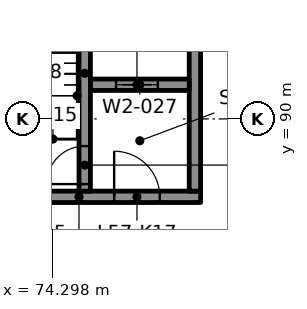
"""IFC4 building model, lengths in metres.
Left out: names, types, materials, properties, quantities, classifications, styles, units other than length and angle.
Written with IfcOpenShell. Run it as: python <this file> out.ifc"""

import sys

from ifc_helpers import new_model, si_unit, direction, frame, frame_2d, origin, place, context, subcontext, project, spatial, rectangle, extrude, element, fill, save


model = new_model("IFC4")
c1 = context("Model", 3, precision=1e-05, world=origin(), true_north=direction((0.0, 1.0)))
c2 = subcontext(c1, "Body", "Model", "MODEL_VIEW")
j1 = project(units=[si_unit("LENGTHUNIT", "METRE"), si_unit("PLANEANGLEUNIT", "RADIAN")], contexts=[c1])
p1 = place(None, origin())
s1 = spatial("IfcSite", under=j1, at=p1, CompositionType="ELEMENT")
p2 = place(p1, origin())
s2 = spatial("IfcBuilding", under=s1, at=p2, CompositionType="ELEMENT")
p3 = place(p2, frame((0.0, 0.0, 241.6)))
s3 = spatial("IfcBuildingStorey", under=s2, at=p3, CompositionType="ELEMENT", Elevation=241.6)
p4 = place(p3, frame((71.8, 87.95, 0.0), z_axis=(0.0, 0.0, 1.0), x_axis=(1.0, 0.0, 0.0)))
e1 = element("IfcWall", 1, at=p4, inside=s3, PredefinedType="SHEAR", context=c2, shape_type="SweptSolid", body=[
    extrude(rectangle(XDim=6.4, YDim=0.3, at=frame_2d((3.2, 0.0))), origin(), (0.0, 0.0, 1.0), 5.55),
])
p5 = place(p4, frame((1.325, 0.0, 0.0)))
e2 = element("IfcOpeningElement", 2, at=p5, cuts=e1, PredefinedType="OPENING", context=c2, shape_type="SweptSolid", body=[
    extrude(rectangle(XDim=1.0, YDim=2.1, at=frame_2d((0.5, 1.05))), frame((0.0, 0.16, 0.0), z_axis=(0.0, -1.0, 0.0), x_axis=(1.0, 0.0, 0.0)), (0.0, 0.0, 1.0), 0.32),
])
p6 = place(p4, frame((4.125, 0.0, 0.0)))
e3 = element("IfcOpeningElement", 3, at=p6, cuts=e1, PredefinedType="OPENING", context=c2, shape_type="SweptSolid", body=[
    extrude(rectangle(XDim=1.2, YDim=2.1, at=frame_2d((0.6, 1.05))), frame((0.0, 0.16, 0.0), z_axis=(0.0, -1.0, 0.0), x_axis=(1.0, 0.0, 0.0)), (0.0, 0.0, 1.0), 0.32),
])
p7 = place(p3, frame((78.05, 88.1, 0.0), z_axis=(0.0, 0.0, 1.0), x_axis=(0.0, 1.0, 0.0)))
e4 = element("IfcWall", 4, at=p7, inside=s3, PredefinedType="SHEAR", context=c2, shape_type="SweptSolid", body=[
    extrude(rectangle(XDim=6.2, YDim=0.3, at=frame_2d((3.1, 0.0))), origin(), (0.0, 0.0, 1.0), 5.55),
])
p8 = place(p3, frame((75.3, 90.9, 0.0), z_axis=(0.0, 0.0, 1.0), x_axis=(1.0, 0.0, 0.0)))
e5 = element("IfcWall", 5, at=p8, inside=s3, PredefinedType="SHEAR", context=c2, shape_type="SweptSolid", body=[
    extrude(rectangle(XDim=2.6, YDim=0.3, at=frame_2d((1.3, 0.0))), origin(), (0.0, 0.0, 1.0), 5.55),
])
p9 = place(p8, frame((0.675, 0.0, 0.0)))
e6 = element("IfcOpeningElement", 6, at=p9, cuts=e5, PredefinedType="OPENING", context=c2, shape_type="SweptSolid", body=[
    extrude(rectangle(XDim=1.1, YDim=2.1, at=frame_2d((0.55, 1.05))), frame((0.0, 0.16, 0.0), z_axis=(0.0, -1.0, 0.0), x_axis=(1.0, 0.0, 0.0)), (0.0, 0.0, 1.0), 0.32),
])
p10 = place(p3, frame((75.15, 88.1, 0.0), z_axis=(0.0, 0.0, 1.0), x_axis=(0.0, 1.0, 0.0)))
e7 = element("IfcWall", 7, at=p10, inside=s3, PredefinedType="SHEAR", context=c2, shape_type="SweptSolid", body=[
    extrude(rectangle(XDim=6.2, YDim=0.3, at=frame_2d((3.1, 0.0))), origin(), (0.0, 0.0, 1.0), 5.55),
])
p11 = place(p10, frame((0.185, 0.0, 0.0)))
e8 = element("IfcOpeningElement", 8, at=p11, cuts=e7, PredefinedType="OPENING", context=c2, shape_type="SweptSolid", body=[
    extrude(rectangle(XDim=1.0, YDim=2.1, at=frame_2d((0.5, 1.05))), frame((0.0, 0.16, 0.0), z_axis=(0.0, -1.0, 0.0), x_axis=(1.0, 0.0, 0.0)), (0.0, 0.0, 1.0), 0.32),
])
p12 = place(p9, origin())
e9 = element("IfcDoor", 9, at=p12, inside=s3, OperationType="DOUBLE_DOOR_SLIDING", PredefinedType="DOOR", context=c2, shape_type="SweptSolid", body=[
    extrude(rectangle(XDim=1.1, YDim=2.1, at=frame_2d((0.55, 1.05))), frame((0.0, 0.025, 0.0), z_axis=(0.0, -1.0, 0.0), x_axis=(1.0, 0.0, 0.0)), (0.0, 0.0, 1.0), 0.05),
])
fill(e6, e9)
p13 = place(p11, origin())
e10 = element("IfcDoor", 10, at=p13, inside=s3, OperationType="SINGLE_SWING_LEFT", PredefinedType="DOOR", context=c2, shape_type="SweptSolid", body=[
    extrude(rectangle(XDim=1.0, YDim=2.1, at=frame_2d((0.5, 1.05))), frame((0.0, 0.025, 0.0), z_axis=(0.0, -1.0, 0.0), x_axis=(1.0, 0.0, 0.0)), (0.0, 0.0, 1.0), 0.05),
])
fill(e8, e10)
p14 = place(p6, origin())
e11 = element("IfcDoor", 11, at=p14, inside=s3, OperationType="SINGLE_SWING_RIGHT", PredefinedType="DOOR", context=c2, shape_type="SweptSolid", body=[
    extrude(rectangle(XDim=1.2, YDim=2.1, at=frame_2d((0.6, 1.05))), frame((0.0, 0.025, 0.0), z_axis=(0.0, -1.0, 0.0), x_axis=(1.0, 0.0, 0.0)), (0.0, 0.0, 1.0), 0.05),
])
fill(e3, e11)
save(model, sys.argv[1])
